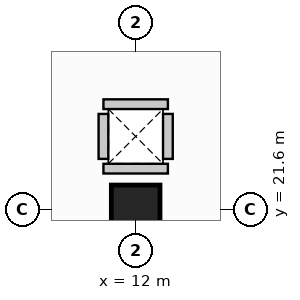
"""IFC4 building model, lengths in metres.
Left out: names, types, materials, properties, quantities, classifications, styles, units other than length and angle.
Written with IfcOpenShell. Run it as: python <this file> out.ifc"""

import sys

from ifc_helpers import new_model, si_unit, direction, frame, frame_2d, origin, origin_2d, place, context, subcontext, project, spatial, rectangle, extrude, element, save


model = new_model("IFC4")
c1 = context("Model", 3, precision=1e-05, world=origin(), true_north=direction((0.0, 1.0)))
c2 = subcontext(c1, "Body", "Model", "MODEL_VIEW")
j1 = project(units=[si_unit("LENGTHUNIT", "METRE"), si_unit("PLANEANGLEUNIT", "RADIAN")], contexts=[c1])
p1 = place(None, origin())
s1 = spatial("IfcSite", under=j1, at=p1, CompositionType="ELEMENT")
p2 = place(p1, origin())
s2 = spatial("IfcBuilding", under=s1, at=p2, CompositionType="ELEMENT")
p3 = place(p2, origin())
s3 = spatial("IfcBuildingStorey", under=s2, at=p3, CompositionType="ELEMENT", Elevation=0.0)
p4 = place(p3, frame((12.0, 21.6, 0.0), z_axis=(0.0, 0.0, 1.0), x_axis=(0.0, 1.0, 0.0)))
e1 = element("IfcColumn", 1, at=p4, inside=s3, PredefinedType="COLUMN", context=c2, shape_type="SweptSolid", body=[
    extrude(rectangle(XDim=0.8, YDim=0.8, at=origin_2d()), origin(), (0.0, 0.0, 1.0), 4.8),
])
for number, where, z_axis, x_axis in (
    (2, (11.47, 22.27, 0.0), (0.0, 0.0, 1.0), (1.0, 0.0, 0.0)),
    (3, (12.53, 23.33, 0.0), (0.0, 0.0, 1.0), (-1.0, 0.0, 0.0)),
):
    element("IfcWall", number, at=place(p3, frame(where, z_axis=z_axis, x_axis=x_axis)), inside=s3, PredefinedType="PARTITIONING", context=c2, shape_type="SweptSolid", body=[
        extrude(rectangle(XDim=1.06, YDim=0.16, at=frame_2d((0.53, 0.0))), origin(), (0.0, 0.0, 1.0), 3.55),
    ])
for number, where, z_axis, x_axis in (
    (4, (11.47, 23.17, 0.0), (0.0, 0.0, 1.0), (0.0, -1.0, 0.0)),
    (5, (12.53, 22.43, 0.0), (0.0, 0.0, 1.0), (0.0, 1.0, 0.0)),
):
    element("IfcWall", number, at=place(p3, frame(where, z_axis=z_axis, x_axis=x_axis)), inside=s3, PredefinedType="PARTITIONING", context=c2, shape_type="SweptSolid", body=[
        extrude(rectangle(XDim=0.74, YDim=0.16, at=frame_2d((0.37, 0.0))), origin(), (0.0, 0.0, 1.0), 3.55),
    ])
save(model, sys.argv[1])
